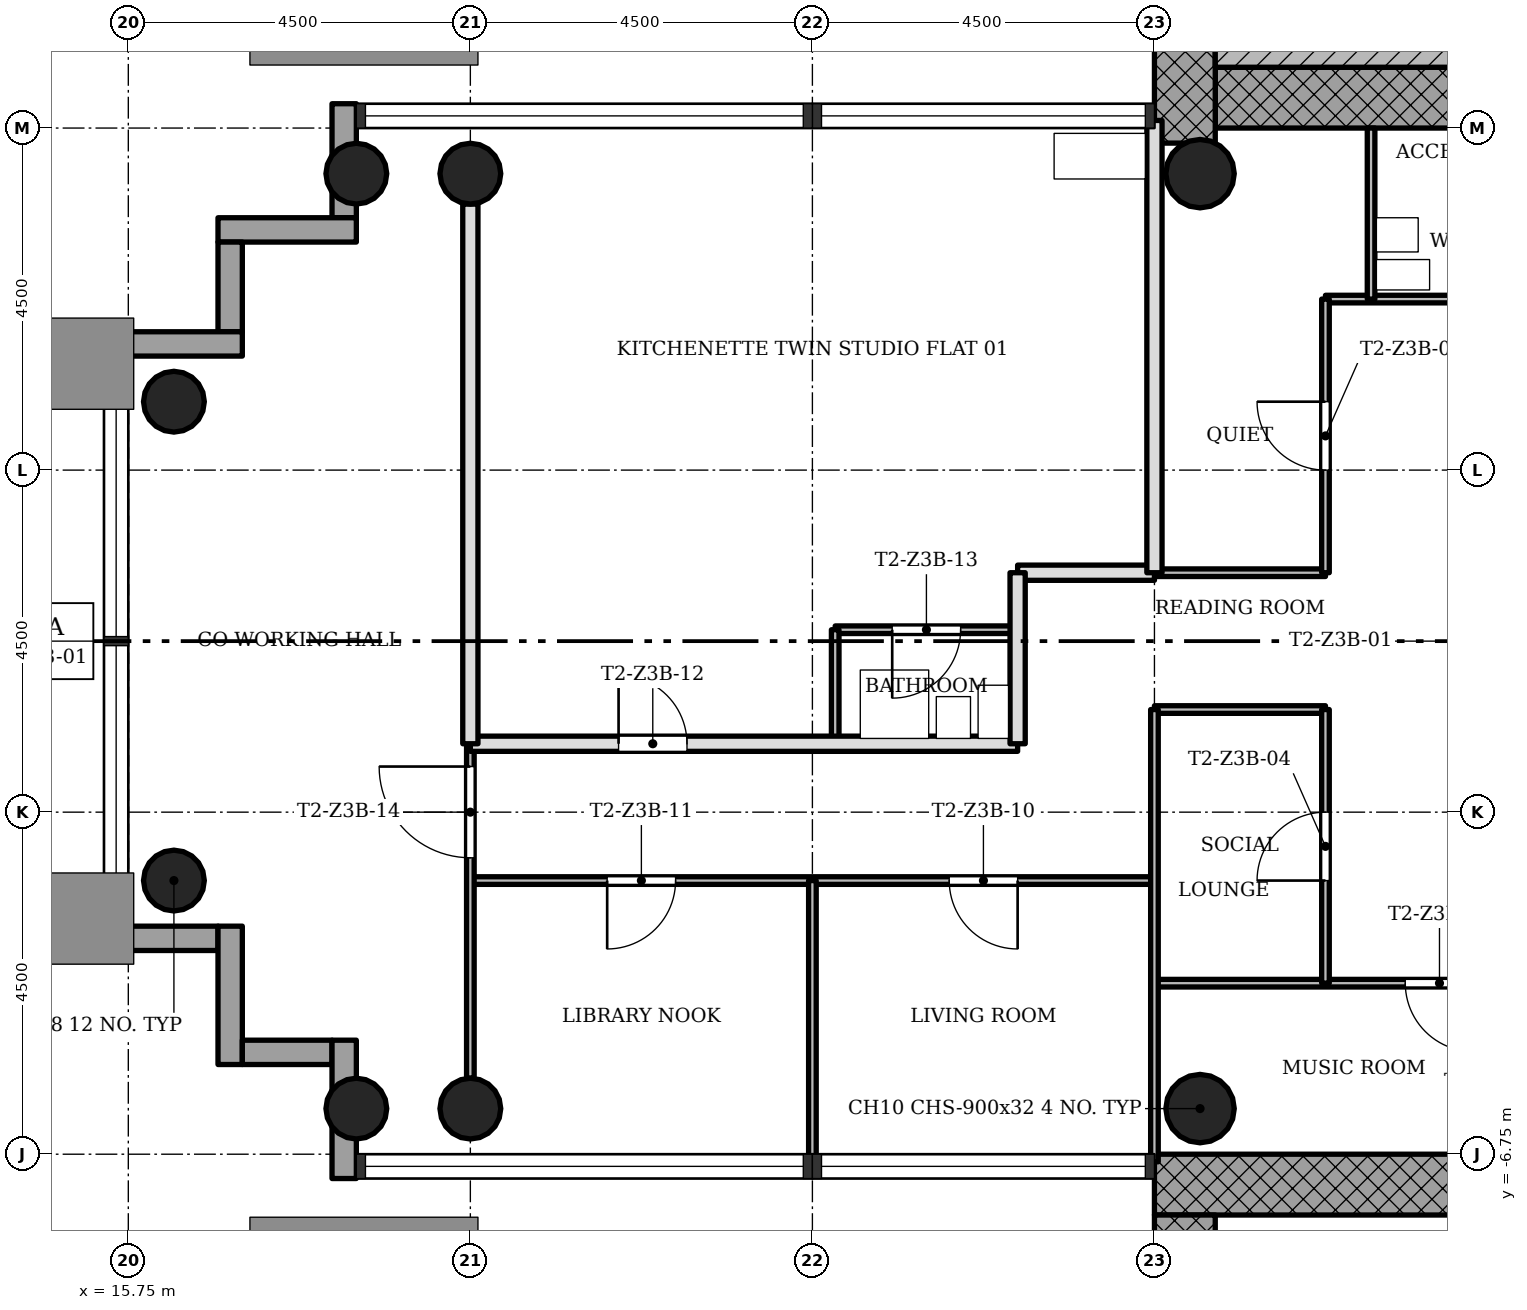
"""IFC4 building model, lengths in metres.
Left out: names, types, materials, properties, quantities, classifications, styles, units other than length and angle.
Written with IfcOpenShell. Run it as: python <this file> out.ifc"""

import sys

from ifc_helpers import new_model, si_unit, direction, frame, frame_2d, origin, origin_2d, place, context, subcontext, project, spatial, rectangle, hollow_circle, extrude, element, fill, save


model = new_model("IFC4")
c1 = context("Model", 3, precision=1e-05, world=origin(), true_north=direction((0.0, 1.0)))
c2 = subcontext(c1, "Body", "Model", "MODEL_VIEW")
j1 = project(units=[si_unit("LENGTHUNIT", "METRE"), si_unit("PLANEANGLEUNIT", "RADIAN")], contexts=[c1])
p1 = place(None, origin())
s1 = spatial("IfcSite", under=j1, at=p1, CompositionType="ELEMENT")
p2 = place(p1, origin())
s2 = spatial("IfcBuilding", under=s1, at=p2, CompositionType="ELEMENT")
p3 = place(p2, frame((0.0, 0.0, 143.9)))
s3 = spatial("IfcBuildingStorey", under=s2, at=p3, CompositionType="ELEMENT", Elevation=143.9)
p4 = place(p3, frame((30.05, 7.15, 0.0), z_axis=(0.0, 0.0, 1.0), x_axis=(1.0, 0.0, 0.0)))
e1 = element("IfcWall", 1, at=p4, inside=s3, PredefinedType="SHEAR", context=c2, shape_type="SweptSolid", body=[
    extrude(rectangle(XDim=12.7, YDim=0.8, at=frame_2d((6.35, 0.0))), origin(), (0.0, 0.0, 1.0), 3.4),
])
p5 = place(p4, frame((5.05, 0.0, 0.0)))
e2 = element("IfcOpeningElement", 2, at=p5, cuts=e1, PredefinedType="OPENING", context=c2, shape_type="SweptSolid", body=[
    extrude(rectangle(XDim=1.8, YDim=2.1, at=frame_2d((0.9, 1.05))), frame((0.0, 0.41, 0.0), z_axis=(0.0, -1.0, 0.0), x_axis=(1.0, 0.0, 0.0)), (0.0, 0.0, 1.0), 0.82),
])
p6 = place(p3, frame((29.65, 15.348, 0.0), z_axis=(0.0, 0.0, 1.0), x_axis=(0.0, -1.0, 0.0)))
e3 = element("IfcWall", 3, at=p6, inside=s3, PredefinedType="SHEAR", context=c2, shape_type="SweptSolid", body=[
    extrude(rectangle(XDim=8.796, YDim=0.8, at=frame_2d((4.398, 0.0))), origin(), (0.0, 0.0, 1.0), 3.4),
])
p7 = place(p3, frame((41.95, -7.15, 0.0), z_axis=(0.0, 0.0, 1.0), x_axis=(-1.0, 0.0, 0.0)))
e4 = element("IfcWall", 4, at=p7, inside=s3, PredefinedType="SHEAR", context=c2, shape_type="SweptSolid", body=[
    extrude(rectangle(XDim=12.7, YDim=0.8, at=frame_2d((6.35, 0.0))), origin(), (0.0, 0.0, 1.0), 3.4),
])
p8 = place(p7, frame((5.05, 0.0, 0.0)))
e5 = element("IfcOpeningElement", 5, at=p8, cuts=e4, PredefinedType="OPENING", context=c2, shape_type="SweptSolid", body=[
    extrude(rectangle(XDim=1.8, YDim=2.1, at=frame_2d((0.9, 1.05))), frame((0.0, 0.41, 0.0), z_axis=(0.0, -1.0, 0.0), x_axis=(1.0, 0.0, 0.0)), (0.0, 0.0, 1.0), 0.82),
])
p9 = place(p3, frame((29.65, -7.55, 0.0), z_axis=(0.0, 0.0, 1.0), x_axis=(0.0, -1.0, 0.0)))
e6 = element("IfcWall", 6, at=p9, inside=s3, PredefinedType="SHEAR", context=c2, shape_type="SweptSolid", body=[
    extrude(rectangle(XDim=8.2, YDim=0.8, at=frame_2d((4.1, 0.0))), origin(), (0.0, 0.0, 1.0), 3.4),
])
for number, where, z_axis, x_axis in (
    (7, (20.25, 6.15, 0.0), (0.0, 0.0, 1.0), (1.0, 0.0, 0.0)),
    (8, (20.25, -6.15, 0.0), (0.0, 0.0, 1.0), (1.0, 0.0, 0.0)),
    (9, (18.75, 6.15, 0.0), (0.0, 0.0, 1.0), (1.0, 0.0, 0.0)),
    (10, (18.75, -6.15, 0.0), (0.0, 0.0, 1.0), (1.0, 0.0, 0.0)),
    (11, (16.35, 3.15, 0.0), (0.0, 0.0, 1.0), (1.0, 0.0, 0.0)),
    (12, (16.35, -3.15, 0.0), (0.0, 0.0, 1.0), (1.0, 0.0, 0.0)),
):
    element("IfcColumn", number, at=place(p3, frame(where, z_axis=z_axis, x_axis=x_axis)), inside=s3, PredefinedType="COLUMN", context=c2, shape_type="SweptSolid", body=[
        extrude(hollow_circle(Radius=0.4, WallThickness=0.028, at=origin_2d()), origin(), (0.0, 0.0, 1.0), 3.4),
    ])
for number, where, z_axis, x_axis in (
    (13, (29.85, 6.15, 0.0), (0.0, 0.0, 1.0), (1.0, 0.0, 0.0)),
    (14, (29.85, -6.15, 0.0), (0.0, 0.0, 1.0), (1.0, 0.0, 0.0)),
):
    element("IfcColumn", number, at=place(p3, frame(where, z_axis=z_axis, x_axis=x_axis)), inside=s3, PredefinedType="COLUMN", context=c2, shape_type="SweptSolid", body=[
        extrude(hollow_circle(Radius=0.45, WallThickness=0.032, at=origin_2d()), origin(), (0.0, 0.0, 1.0), 3.4),
    ])
p10 = place(p3, frame((18.59, 7.07, -0.3), z_axis=(0.0, 0.0, 1.0), x_axis=(0.0, -1.0, 0.0)))
e15 = element("IfcWall", 15, at=p10, inside=s3, PredefinedType="STANDARD", context=c2, shape_type="SweptSolid", body=[
    extrude(rectangle(XDim=1.5, YDim=0.32, at=frame_2d((0.75, 0.0))), origin(), (0.0, 0.0, 1.0), 3.4),
])
p11 = place(p3, frame((18.75, 5.41, -0.3), z_axis=(0.0, 0.0, 1.0), x_axis=(-1.0, 0.0, 0.0)))
e16 = element("IfcWall", 16, at=p11, inside=s3, PredefinedType="STANDARD", context=c2, shape_type="SweptSolid", body=[
    extrude(rectangle(XDim=1.82, YDim=0.32, at=frame_2d((0.91, 0.0))), origin(), (0.0, 0.0, 1.0), 3.4),
])
p12 = place(p3, frame((17.09, 5.25, -0.3), z_axis=(0.0, 0.0, 1.0), x_axis=(0.0, -1.0, 0.0)))
e17 = element("IfcWall", 17, at=p12, inside=s3, PredefinedType="STANDARD", context=c2, shape_type="SweptSolid", body=[
    extrude(rectangle(XDim=1.18, YDim=0.32, at=frame_2d((0.59, 0.0))), origin(), (0.0, 0.0, 1.0), 3.4),
])
p13 = place(p3, frame((17.25, 3.91, -0.3), z_axis=(0.0, 0.0, 1.0), x_axis=(-1.0, 0.0, 0.0)))
e18 = element("IfcWall", 18, at=p13, inside=s3, PredefinedType="STANDARD", context=c2, shape_type="SweptSolid", body=[
    extrude(rectangle(XDim=1.82, YDim=0.32, at=frame_2d((0.91, 0.0))), origin(), (0.0, 0.0, 1.0), 3.4),
])
p14 = place(p3, frame((15.43, -3.91, -0.3), z_axis=(0.0, 0.0, 1.0), x_axis=(1.0, 0.0, 0.0)))
e19 = element("IfcWall", 19, at=p14, inside=s3, PredefinedType="STANDARD", context=c2, shape_type="SweptSolid", body=[
    extrude(rectangle(XDim=1.5, YDim=0.32, at=frame_2d((0.75, 0.0))), origin(), (0.0, 0.0, 1.0), 3.4),
])
p15 = place(p3, frame((17.09, -3.75, -0.3), z_axis=(0.0, 0.0, 1.0), x_axis=(0.0, -1.0, 0.0)))
e20 = element("IfcWall", 20, at=p15, inside=s3, PredefinedType="STANDARD", context=c2, shape_type="SweptSolid", body=[
    extrude(rectangle(XDim=1.82, YDim=0.32, at=frame_2d((0.91, 0.0))), origin(), (0.0, 0.0, 1.0), 3.4),
])
p16 = place(p3, frame((17.25, -5.41, -0.3), z_axis=(0.0, 0.0, 1.0), x_axis=(1.0, 0.0, 0.0)))
e21 = element("IfcWall", 21, at=p16, inside=s3, PredefinedType="STANDARD", context=c2, shape_type="SweptSolid", body=[
    extrude(rectangle(XDim=1.18, YDim=0.32, at=frame_2d((0.59, 0.0))), origin(), (0.0, 0.0, 1.0), 3.4),
])
p17 = place(p3, frame((18.59, -5.25, -0.3), z_axis=(0.0, 0.0, 1.0), x_axis=(0.0, -1.0, 0.0)))
e22 = element("IfcWall", 22, at=p17, inside=s3, PredefinedType="STANDARD", context=c2, shape_type="SweptSolid", body=[
    extrude(rectangle(XDim=1.82, YDim=0.32, at=frame_2d((0.91, 0.0))), origin(), (0.0, 0.0, 1.0), 3.4),
])
p18 = place(p3, frame((34.5, -4.5, 0.0), z_axis=(0.0, 0.0, 1.0), x_axis=(-1.0, 0.0, 0.0)))
e23 = element("IfcWall", 23, at=p18, inside=s3, PredefinedType="PARTITIONING", context=c2, shape_type="SweptSolid", body=[
    extrude(rectangle(XDim=5.25, YDim=0.1, at=frame_2d((2.625, 0.0))), origin(), (0.0, 0.0, 1.0), 3.0),
])
p19 = place(p18, frame((1.05, 0.0, 0.0)))
e24 = element("IfcOpeningElement", 24, at=p19, cuts=e23, PredefinedType="OPENING", context=c2, shape_type="SweptSolid", body=[
    extrude(rectangle(XDim=0.9, YDim=2.1, at=frame_2d((0.45, 1.05))), frame((0.0, 0.06, 0.0), z_axis=(0.0, -1.0, 0.0), x_axis=(1.0, 0.0, 0.0)), (0.0, 0.0, 1.0), 0.12),
])
p20 = place(p3, frame((29.25, -3.15, 0.0), z_axis=(0.0, 0.0, 1.0), x_axis=(-1.0, 0.0, 0.0)))
e25 = element("IfcWall", 25, at=p20, inside=s3, PredefinedType="PARTITIONING", context=c2, shape_type="SweptSolid", body=[
    extrude(rectangle(XDim=9.0, YDim=0.1, at=frame_2d((4.5, 0.0))), origin(), (0.0, 0.0, 1.0), 3.0),
])
p21 = place(p20, frame((1.8, 0.0, 0.0)))
e26 = element("IfcOpeningElement", 26, at=p21, cuts=e25, PredefinedType="OPENING", context=c2, shape_type="SweptSolid", body=[
    extrude(rectangle(XDim=0.9, YDim=2.1, at=frame_2d((0.45, 1.05))), frame((0.0, 0.06, 0.0), z_axis=(0.0, -1.0, 0.0), x_axis=(1.0, 0.0, 0.0)), (0.0, 0.0, 1.0), 0.12),
])
p22 = place(p20, frame((6.3, 0.0, 0.0)))
e27 = element("IfcOpeningElement", 27, at=p22, cuts=e25, PredefinedType="OPENING", context=c2, shape_type="SweptSolid", body=[
    extrude(rectangle(XDim=0.9, YDim=2.1, at=frame_2d((0.45, 1.05))), frame((0.0, 0.06, 0.0), z_axis=(0.0, -1.0, 0.0), x_axis=(1.0, 0.0, 0.0)), (0.0, 0.0, 1.0), 0.12),
])
p23 = place(p3, frame((27.45, -1.35, 0.0), z_axis=(0.0, 0.0, 1.0), x_axis=(-1.0, 0.0, 0.0)))
e28 = element("IfcWall", 28, at=p23, inside=s3, PredefinedType="SOLIDWALL", context=c2, shape_type="SweptSolid", body=[
    extrude(rectangle(XDim=7.2, YDim=0.2, at=frame_2d((3.6, 0.0))), origin(), (0.0, 0.0, 1.0), 3.0),
])
p24 = place(p23, frame((4.35, 0.0, 0.0)))
e29 = element("IfcOpeningElement", 29, at=p24, cuts=e28, PredefinedType="OPENING", context=c2, shape_type="SweptSolid", body=[
    extrude(rectangle(XDim=0.9, YDim=2.1, at=frame_2d((0.45, 1.05))), frame((0.0, 0.11, 0.0), z_axis=(0.0, -1.0, 0.0), x_axis=(1.0, 0.0, 0.0)), (0.0, 0.0, 1.0), 0.22),
])
p25 = place(p3, frame((31.5, -0.9, 0.0), z_axis=(0.0, 0.0, 1.0), x_axis=(-1.0, 0.0, 0.0)))
e30 = element("IfcWall", 30, at=p25, inside=s3, PredefinedType="PARTITIONING", context=c2, shape_type="SweptSolid", body=[
    extrude(rectangle(XDim=2.25, YDim=0.1, at=frame_2d((1.125, 0.0))), origin(), (0.0, 0.0, 1.0), 3.0),
])
p26 = place(p3, frame((27.45, 0.15, 0.0), z_axis=(0.0, 0.0, 1.0), x_axis=(-1.0, 0.0, 0.0)))
e31 = element("IfcWall", 31, at=p26, inside=s3, PredefinedType="PARTITIONING", context=c2, shape_type="SweptSolid", body=[
    extrude(rectangle(XDim=2.4, YDim=0.1, at=frame_2d((1.2, 0.0))), origin(), (0.0, 0.0, 1.0), 3.0),
])
p27 = place(p26, frame((0.75, 0.0, 0.0)))
e32 = element("IfcOpeningElement", 32, at=p27, cuts=e31, PredefinedType="OPENING", context=c2, shape_type="SweptSolid", body=[
    extrude(rectangle(XDim=0.9, YDim=2.1, at=frame_2d((0.45, 1.05))), frame((0.0, 0.06, 0.0), z_axis=(0.0, -1.0, 0.0), x_axis=(1.0, 0.0, 0.0)), (0.0, 0.0, 1.0), 0.12),
])
p28 = place(p3, frame((31.5, 0.9, 0.0), z_axis=(0.0, 0.0, 1.0), x_axis=(-1.0, 0.0, 0.0)))
e33 = element("IfcWall", 33, at=p28, inside=s3, PredefinedType="PARTITIONING", context=c2, shape_type="SweptSolid", body=[
    extrude(rectangle(XDim=2.25, YDim=0.1, at=frame_2d((1.125, 0.0))), origin(), (0.0, 0.0, 1.0), 3.0),
])
p29 = place(p3, frame((29.25, 0.9, 0.0), z_axis=(0.0, 0.0, 1.0), x_axis=(-1.0, 0.0, 0.0)))
e34 = element("IfcWall", 34, at=p29, inside=s3, PredefinedType="SOLIDWALL", context=c2, shape_type="SweptSolid", body=[
    extrude(rectangle(XDim=1.8, YDim=0.2, at=frame_2d((0.9, 0.0))), origin(), (0.0, 0.0, 1.0), 3.0),
])
p30 = place(p3, frame((34.5, 4.5, 0.0), z_axis=(0.0, 0.0, 1.0), x_axis=(-1.0, 0.0, 0.0)))
e35 = element("IfcWall", 35, at=p30, inside=s3, PredefinedType="PARTITIONING", context=c2, shape_type="SweptSolid", body=[
    extrude(rectangle(XDim=3.0, YDim=0.1, at=frame_2d((1.5, 0.0))), origin(), (0.0, 0.0, 1.0), 3.0),
])
p31 = place(p3, frame((32.1, 4.5, 0.0), z_axis=(0.0, 0.0, 1.0), x_axis=(0.0, 1.0, 0.0)))
e36 = element("IfcWall", 36, at=p31, inside=s3, PredefinedType="PARTITIONING", context=c2, shape_type="SweptSolid", body=[
    extrude(rectangle(XDim=2.25, YDim=0.1, at=frame_2d((1.125, 0.0))), origin(), (0.0, 0.0, 1.0), 3.0),
])
p32 = place(p3, frame((31.5, -4.5, 0.0), z_axis=(0.0, 0.0, 1.0), x_axis=(0.0, 1.0, 0.0)))
e37 = element("IfcWall", 37, at=p32, inside=s3, PredefinedType="PARTITIONING", context=c2, shape_type="SweptSolid", body=[
    extrude(rectangle(XDim=3.6, YDim=0.1, at=frame_2d((1.8, 0.0))), origin(), (0.0, 0.0, 1.0), 3.0),
])
p33 = place(p32, frame((1.35, 0.0, 0.0)))
e38 = element("IfcOpeningElement", 38, at=p33, cuts=e37, PredefinedType="OPENING", context=c2, shape_type="SweptSolid", body=[
    extrude(rectangle(XDim=0.9, YDim=2.1, at=frame_2d((0.45, 1.05))), frame((0.0, 0.06, 0.0), z_axis=(0.0, -1.0, 0.0), x_axis=(1.0, 0.0, 0.0)), (0.0, 0.0, 1.0), 0.12),
])
p34 = place(p3, frame((31.5, 0.9, 0.0), z_axis=(0.0, 0.0, 1.0), x_axis=(0.0, 1.0, 0.0)))
e39 = element("IfcWall", 39, at=p34, inside=s3, PredefinedType="PARTITIONING", context=c2, shape_type="SweptSolid", body=[
    extrude(rectangle(XDim=3.6, YDim=0.1, at=frame_2d((1.8, 0.0))), origin(), (0.0, 0.0, 1.0), 3.0),
])
p35 = place(p34, frame((1.35, 0.0, 0.0)))
e40 = element("IfcOpeningElement", 40, at=p35, cuts=e39, PredefinedType="OPENING", context=c2, shape_type="SweptSolid", body=[
    extrude(rectangle(XDim=0.9, YDim=2.1, at=frame_2d((0.45, 1.05))), frame((0.0, 0.06, 0.0), z_axis=(0.0, -1.0, 0.0), x_axis=(1.0, 0.0, 0.0)), (0.0, 0.0, 1.0), 0.12),
])
p36 = place(p3, frame((29.25, -6.85, 0.0), z_axis=(0.0, 0.0, 1.0), x_axis=(0.0, 1.0, 0.0)))
e41 = element("IfcWall", 41, at=p36, inside=s3, PredefinedType="PARTITIONING", context=c2, shape_type="SweptSolid", body=[
    extrude(rectangle(XDim=5.95, YDim=0.1, at=frame_2d((2.975, 0.0))), origin(), (0.0, 0.0, 1.0), 3.0),
])
p37 = place(p3, frame((29.25, 0.9, 0.0), z_axis=(0.0, 0.0, 1.0), x_axis=(0.0, 1.0, 0.0)))
e42 = element("IfcWall", 42, at=p37, inside=s3, PredefinedType="SOLIDWALL", context=c2, shape_type="SweptSolid", body=[
    extrude(rectangle(XDim=5.95, YDim=0.2, at=frame_2d((2.975, 0.0))), origin(), (0.0, 0.0, 1.0), 3.0),
])
p38 = place(p3, frame((27.45, -1.35, 0.0), z_axis=(0.0, 0.0, 1.0), x_axis=(0.0, 1.0, 0.0)))
e43 = element("IfcWall", 43, at=p38, inside=s3, PredefinedType="SOLIDWALL", context=c2, shape_type="SweptSolid", body=[
    extrude(rectangle(XDim=2.25, YDim=0.2, at=frame_2d((1.125, 0.0))), origin(), (0.0, 0.0, 1.0), 3.0),
])
p39 = place(p3, frame((25.05, -1.35, 0.0), z_axis=(0.0, 0.0, 1.0), x_axis=(0.0, 1.0, 0.0)))
e44 = element("IfcWall", 44, at=p39, inside=s3, PredefinedType="PARTITIONING", context=c2, shape_type="SweptSolid", body=[
    extrude(rectangle(XDim=1.5, YDim=0.1, at=frame_2d((0.75, 0.0))), origin(), (0.0, 0.0, 1.0), 3.0),
])
p40 = place(p3, frame((24.75, -6.85, 0.0), z_axis=(0.0, 0.0, 1.0), x_axis=(0.0, 1.0, 0.0)))
e45 = element("IfcWall", 45, at=p40, inside=s3, PredefinedType="PARTITIONING", context=c2, shape_type="SweptSolid", body=[
    extrude(rectangle(XDim=3.7, YDim=0.1, at=frame_2d((1.85, 0.0))), origin(), (0.0, 0.0, 1.0), 3.0),
])
p41 = place(p3, frame((20.25, -5.75, 0.0), z_axis=(0.0, 0.0, 1.0), x_axis=(0.0, 1.0, 0.0)))
e46 = element("IfcWall", 46, at=p41, inside=s3, PredefinedType="PARTITIONING", context=c2, shape_type="SweptSolid", body=[
    extrude(rectangle(XDim=4.4, YDim=0.1, at=frame_2d((2.2, 0.0))), origin(), (0.0, 0.0, 1.0), 3.0),
])
p42 = place(p41, frame((2.9, 0.0, 0.0)))
e47 = element("IfcOpeningElement", 47, at=p42, cuts=e46, PredefinedType="OPENING", context=c2, shape_type="SweptSolid", body=[
    extrude(rectangle(XDim=1.2, YDim=2.1, at=frame_2d((0.6, 1.05))), frame((0.0, 0.06, 0.0), z_axis=(0.0, -1.0, 0.0), x_axis=(1.0, 0.0, 0.0)), (0.0, 0.0, 1.0), 0.12),
])
p43 = place(p3, frame((20.25, -1.35, 0.0), z_axis=(0.0, 0.0, 1.0), x_axis=(0.0, 1.0, 0.0)))
e48 = element("IfcWall", 48, at=p43, inside=s3, PredefinedType="SOLIDWALL", context=c2, shape_type="SweptSolid", body=[
    extrude(rectangle(XDim=7.1, YDim=0.2, at=frame_2d((3.55, 0.0))), origin(), (0.0, 0.0, 1.0), 3.0),
])
p44 = place(p3, frame((34.15, 7.75, 0.0), z_axis=(0.0, 0.0, 1.0), x_axis=(-1.0, 0.0, 0.0)))
e49 = element("IfcWall", 49, at=p44, inside=s3, PredefinedType="SHEAR", context=c2, shape_type="SweptSolid", body=[
    extrude(rectangle(XDim=4.1, YDim=0.4, at=frame_2d((2.05, 0.0))), origin(), (0.0, 0.0, 1.0), 3.4),
])
p45 = place(p35, origin())
e50 = element("IfcDoor", 50, at=p45, inside=s3, OperationType="SINGLE_SWING_LEFT", PredefinedType="DOOR", context=c2, shape_type="SweptSolid", body=[
    extrude(rectangle(XDim=0.9, YDim=2.1, at=frame_2d((0.45, 1.05))), frame((0.0, 0.025, 0.0), z_axis=(0.0, -1.0, 0.0), x_axis=(1.0, 0.0, 0.0)), (0.0, 0.0, 1.0), 0.05),
])
fill(e40, e50)
p46 = place(p33, origin())
e51 = element("IfcDoor", 51, at=p46, inside=s3, OperationType="SINGLE_SWING_RIGHT", PredefinedType="DOOR", context=c2, shape_type="SweptSolid", body=[
    extrude(rectangle(XDim=0.9, YDim=2.1, at=frame_2d((0.45, 1.05))), frame((0.0, 0.025, 0.0), z_axis=(0.0, -1.0, 0.0), x_axis=(1.0, 0.0, 0.0)), (0.0, 0.0, 1.0), 0.05),
])
fill(e38, e51)
p47 = place(p19, origin())
e52 = element("IfcDoor", 52, at=p47, inside=s3, OperationType="SINGLE_SWING_RIGHT", PredefinedType="DOOR", context=c2, shape_type="SweptSolid", body=[
    extrude(rectangle(XDim=0.9, YDim=2.1, at=frame_2d((0.45, 1.05))), frame((0.0, 0.025, 0.0), z_axis=(0.0, -1.0, 0.0), x_axis=(1.0, 0.0, 0.0)), (0.0, 0.0, 1.0), 0.05),
])
fill(e24, e52)
p48 = place(p21, origin())
e53 = element("IfcDoor", 53, at=p48, inside=s3, OperationType="SINGLE_SWING_RIGHT", PredefinedType="DOOR", context=c2, shape_type="SweptSolid", body=[
    extrude(rectangle(XDim=0.9, YDim=2.1, at=frame_2d((0.45, 1.05))), frame((0.0, 0.025, 0.0), z_axis=(0.0, -1.0, 0.0), x_axis=(1.0, 0.0, 0.0)), (0.0, 0.0, 1.0), 0.05),
])
fill(e26, e53)
p49 = place(p22, origin())
e54 = element("IfcDoor", 54, at=p49, inside=s3, OperationType="SINGLE_SWING_LEFT", PredefinedType="DOOR", context=c2, shape_type="SweptSolid", body=[
    extrude(rectangle(XDim=0.9, YDim=2.1, at=frame_2d((0.45, 1.05))), frame((0.0, 0.025, 0.0), z_axis=(0.0, -1.0, 0.0), x_axis=(1.0, 0.0, 0.0)), (0.0, 0.0, 1.0), 0.05),
])
fill(e27, e54)
p50 = place(p24, origin())
e55 = element("IfcDoor", 55, at=p50, inside=s3, OperationType="SINGLE_SWING_RIGHT", PredefinedType="DOOR", context=c2, shape_type="SweptSolid", body=[
    extrude(rectangle(XDim=0.9, YDim=2.1, at=frame_2d((0.45, 1.05))), frame((0.0, 0.025, 0.0), z_axis=(0.0, -1.0, 0.0), x_axis=(1.0, 0.0, 0.0)), (0.0, 0.0, 1.0), 0.05),
])
fill(e29, e55)
p51 = place(p27, origin())
e56 = element("IfcDoor", 56, at=p51, inside=s3, OperationType="SINGLE_SWING_LEFT", PredefinedType="DOOR", context=c2, shape_type="SweptSolid", body=[
    extrude(rectangle(XDim=0.9, YDim=2.1, at=frame_2d((0.45, 1.05))), frame((0.0, 0.025, 0.0), z_axis=(0.0, -1.0, 0.0), x_axis=(1.0, 0.0, 0.0)), (0.0, 0.0, 1.0), 0.05),
])
fill(e32, e56)
p52 = place(p42, origin())
e57 = element("IfcDoor", 57, at=p52, inside=s3, OperationType="SINGLE_SWING_LEFT", PredefinedType="DOOR", context=c2, shape_type="SweptSolid", body=[
    extrude(rectangle(XDim=1.2, YDim=2.1, at=frame_2d((0.6, 1.05))), frame((0.0, 0.025, 0.0), z_axis=(0.0, -1.0, 0.0), x_axis=(1.0, 0.0, 0.0)), (0.0, 0.0, 1.0), 0.05),
])
fill(e47, e57)
save(model, sys.argv[1])
